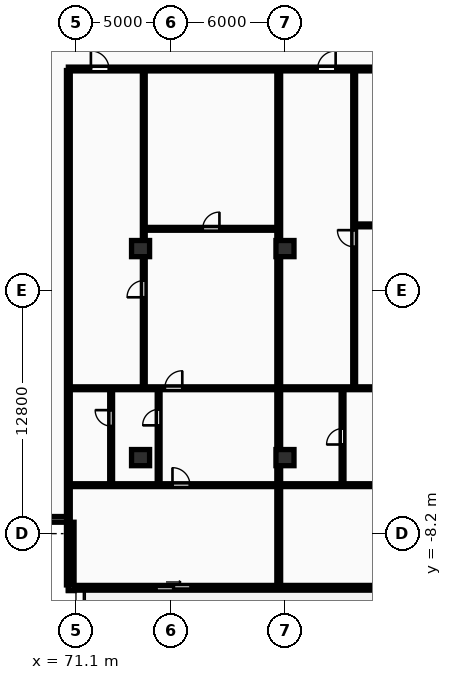
"""IFC4 building model, lengths in metres.
Left out: names, types, materials, properties, quantities, classifications, styles, units other than length and angle.
Written with IfcOpenShell. Run it as: python <this file> out.ifc"""

import sys

from ifc_helpers import new_model, si_unit, direction, frame, frame_2d, origin, origin_2d, place, context, subcontext, project, spatial, rectangle, extrude, element, fill, save


model = new_model("IFC4")
c1 = context("Model", 3, precision=1e-05, world=origin(), true_north=direction((0.0, 1.0)))
c2 = subcontext(c1, "Body", "Model", "MODEL_VIEW")
j1 = project(units=[si_unit("LENGTHUNIT", "METRE"), si_unit("PLANEANGLEUNIT", "RADIAN")], contexts=[c1])
p1 = place(None, origin())
s1 = spatial("IfcSite", under=j1, at=p1, CompositionType="ELEMENT")
p2 = place(p1, origin())
s2 = spatial("IfcBuilding", under=s1, at=p2, CompositionType="ELEMENT")
p3 = place(p2, frame((0.0, 0.0, 24.0)))
s3 = spatial("IfcBuildingStorey", under=s2, at=p3, CompositionType="ELEMENT", Elevation=24.0)
for number, where, z_axis, x_axis in (
    (1, (74.5, -4.2, 0.0), (0.0, 0.0, 1.0), (1.0, 0.0, 0.0)),
    (2, (74.5, 6.8, 0.0), (0.0, 0.0, 1.0), (1.0, 0.0, 0.0)),
    (3, (82.1, -4.2, 0.0), (0.0, 0.0, 1.0), (1.0, 0.0, 0.0)),
    (4, (82.1, 6.8, 0.0), (0.0, 0.0, 1.0), (1.0, 0.0, 0.0)),
):
    element("IfcColumn", number, at=place(p3, frame(where, z_axis=z_axis, x_axis=x_axis)), inside=s3, PredefinedType="COLUMN", context=c2, shape_type="SweptSolid", body=[
        extrude(rectangle(XDim=0.95, YDim=0.85, at=origin_2d()), origin(), (0.0, 0.0, 1.0), 3.25),
    ])
p4 = place(p3, frame((70.7, -11.05, 0.0), z_axis=(0.0, 0.0, 1.0), x_axis=(1.0, 0.0, 0.0)))
e5 = element("IfcWall", 5, at=p4, inside=s3, PredefinedType="STANDARD", context=c2, shape_type="SweptSolid", body=[
    extrude(rectangle(XDim=62.0, YDim=0.25, at=frame_2d((31.0, 0.0))), origin(), (0.0, 0.0, 1.0), 2.97),
])
p5 = place(p4, frame((4.636, 0.0, 0.0)))
e6 = element("IfcOpeningElement", 6, at=p5, cuts=e5, PredefinedType="OPENING", context=c2, shape_type="SweptSolid", body=[
    extrude(rectangle(XDim=1.8, YDim=2.2, at=frame_2d((0.9, 1.1))), frame((0.0, 0.135, 0.0), z_axis=(0.0, -1.0, 0.0), x_axis=(1.0, 0.0, 0.0)), (0.0, 0.0, 1.0), 0.27),
])
p6 = place(p4, frame((16.261, 0.0, 0.0)))
e7 = element("IfcOpeningElement", 7, at=p6, cuts=e5, PredefinedType="OPENING", context=c2, shape_type="SweptSolid", body=[
    extrude(rectangle(XDim=1.8, YDim=2.2, at=frame_2d((0.9, 1.1))), frame((0.0, 0.135, 0.0), z_axis=(0.0, -1.0, 0.0), x_axis=(1.0, 0.0, 0.0)), (0.0, 0.0, 1.0), 0.27),
])
p7 = place(p4, frame((27.886, 0.0, 0.0)))
e8 = element("IfcOpeningElement", 8, at=p7, cuts=e5, PredefinedType="OPENING", context=c2, shape_type="SweptSolid", body=[
    extrude(rectangle(XDim=1.8, YDim=2.2, at=frame_2d((0.9, 1.1))), frame((0.0, 0.135, 0.0), z_axis=(0.0, -1.0, 0.0), x_axis=(1.0, 0.0, 0.0)), (0.0, 0.0, 1.0), 0.27),
])
p8 = place(p4, frame((40.064, 0.0, 0.0)))
e9 = element("IfcOpeningElement", 9, at=p8, cuts=e5, PredefinedType="OPENING", context=c2, shape_type="SweptSolid", body=[
    extrude(rectangle(XDim=1.8, YDim=2.2, at=frame_2d((0.9, 1.1))), frame((0.0, 0.135, 0.0), z_axis=(0.0, -1.0, 0.0), x_axis=(1.0, 0.0, 0.0)), (0.0, 0.0, 1.0), 0.27),
])
p9 = place(p4, frame((51.124, 0.0, 0.0)))
e10 = element("IfcOpeningElement", 10, at=p9, cuts=e5, PredefinedType="OPENING", context=c2, shape_type="SweptSolid", body=[
    extrude(rectangle(XDim=1.8, YDim=2.2, at=frame_2d((0.9, 1.1))), frame((0.0, 0.135, 0.0), z_axis=(0.0, -1.0, 0.0), x_axis=(1.0, 0.0, 0.0)), (0.0, 0.0, 1.0), 0.27),
])
p10 = place(p4, frame((57.9, 0.0, 0.85)))
e11 = element("IfcOpeningElement", 11, at=p10, cuts=e5, PredefinedType="OPENING", context=c2, shape_type="SweptSolid", body=[
    extrude(rectangle(XDim=2.4, YDim=1.9, at=frame_2d((1.2, 0.95))), frame((0.0, 0.135, 0.0), z_axis=(0.0, -1.0, 0.0), x_axis=(1.0, 0.0, 0.0)), (0.0, 0.0, 1.0), 0.27),
])
for number, where, z_axis, x_axis in (
    (12, (67.1, -7.45, 0.0), (0.0, 0.0, 1.0), (1.0, 0.0, 0.0)),
    (13, (70.85, -7.6, 0.0), (0.0, 0.0, 1.0), (0.0, -1.0, 0.0)),
):
    element("IfcWall", number, at=place(p3, frame(where, z_axis=z_axis, x_axis=x_axis)), inside=s3, PredefinedType="STANDARD", context=c2, shape_type="SweptSolid", body=[
        extrude(rectangle(XDim=3.6, YDim=0.3, at=frame_2d((1.8, 0.0))), origin(), (0.0, 0.0, 1.0), 2.97),
    ])
p11 = place(p3, frame((70.7, -10.9, 0.0), z_axis=(0.0, 0.0, 1.0), x_axis=(0.0, 1.0, 0.0)))
e14 = element("IfcWall", 14, at=p11, inside=s3, PredefinedType="PARTITIONING", context=c2, shape_type="SweptSolid", body=[
    extrude(rectangle(XDim=27.07, YDim=0.2, at=frame_2d((13.535, 0.0))), origin(), (0.0, 0.0, 1.0), 2.97),
])
p12 = place(p3, frame((81.771, -10.9, 0.0), z_axis=(0.0, 0.0, 1.0), x_axis=(0.0, 1.0, 0.0)))
e15 = element("IfcWall", 15, at=p12, inside=s3, PredefinedType="PARTITIONING", context=c2, shape_type="SweptSolid", body=[
    extrude(rectangle(XDim=27.07, YDim=0.2, at=frame_2d((13.535, 0.0))), origin(), (0.0, 0.0, 1.0), 2.22),
])
p13 = place(p3, frame((74.73, 7.84, 0.0), z_axis=(0.0, 0.0, 1.0), x_axis=(1.0, 0.0, 0.0)))
e16 = element("IfcWall", 16, at=p13, inside=s3, PredefinedType="PARTITIONING", context=c2, shape_type="SweptSolid", body=[
    extrude(rectangle(XDim=6.961, YDim=0.15, at=frame_2d((3.481, 0.0))), origin(), (0.0, 0.0, 1.0), 2.97),
])
p14 = place(p13, frame((3.041, 0.0, 0.0)))
e17 = element("IfcOpeningElement", 17, at=p14, cuts=e16, PredefinedType="OPENING", context=c2, shape_type="SweptSolid", body=[
    extrude(rectangle(XDim=0.88, YDim=2.06, at=frame_2d((0.44, 1.03))), frame((0.0, 0.085, 0.0), z_axis=(0.0, -1.0, 0.0), x_axis=(1.0, 0.0, 0.0)), (0.0, 0.0, 1.0), 0.17),
])
p15 = place(p3, frame((74.67, -0.51, 0.0), z_axis=(0.0, 0.0, 1.0), x_axis=(0.0, 1.0, 0.0)))
e18 = element("IfcWall", 18, at=p15, inside=s3, PredefinedType="PARTITIONING", context=c2, shape_type="SweptSolid", body=[
    extrude(rectangle(XDim=16.7, YDim=0.15, at=frame_2d((8.35, 0.0))), origin(), (0.0, 0.0, 1.0), 2.22),
])
p16 = place(p15, frame((4.747, 0.0, 0.0)))
e19 = element("IfcOpeningElement", 19, at=p16, cuts=e18, PredefinedType="OPENING", context=c2, shape_type="SweptSolid", body=[
    extrude(rectangle(XDim=0.88, YDim=2.06, at=frame_2d((0.44, 1.03))), frame((0.0, 0.085, 0.0), z_axis=(0.0, -1.0, 0.0), x_axis=(1.0, 0.0, 0.0)), (0.0, 0.0, 1.0), 0.17),
])
p17 = place(p3, frame((72.951, -5.59, 0.0), z_axis=(0.0, 0.0, 1.0), x_axis=(0.0, 1.0, 0.0)))
e20 = element("IfcWall", 20, at=p17, inside=s3, PredefinedType="PARTITIONING", context=c2, shape_type="SweptSolid", body=[
    extrude(rectangle(XDim=5.0, YDim=0.15, at=frame_2d((2.5, 0.0))), origin(), (0.0, 0.0, 1.0), 2.97),
])
p18 = place(p17, frame((3.049, 0.0, 0.0)))
e21 = element("IfcOpeningElement", 21, at=p18, cuts=e20, PredefinedType="OPENING", context=c2, shape_type="SweptSolid", body=[
    extrude(rectangle(XDim=0.84, YDim=2.04, at=frame_2d((0.42, 1.02))), frame((0.0, 0.085, 0.0), z_axis=(0.0, -1.0, 0.0), x_axis=(1.0, 0.0, 0.0)), (0.0, 0.0, 1.0), 0.17),
])
p19 = place(p3, frame((75.451, -5.59, 0.0), z_axis=(0.0, 0.0, 1.0), x_axis=(0.0, 1.0, 0.0)))
e22 = element("IfcWall", 22, at=p19, inside=s3, PredefinedType="PARTITIONING", context=c2, shape_type="SweptSolid", body=[
    extrude(rectangle(XDim=5.0, YDim=0.15, at=frame_2d((2.5, 0.0))), origin(), (0.0, 0.0, 1.0), 2.97),
])
p20 = place(p19, frame((3.088, 0.0, 0.0)))
e23 = element("IfcOpeningElement", 23, at=p20, cuts=e22, PredefinedType="OPENING", context=c2, shape_type="SweptSolid", body=[
    extrude(rectangle(XDim=0.84, YDim=2.04, at=frame_2d((0.42, 1.02))), frame((0.0, 0.085, 0.0), z_axis=(0.0, -1.0, 0.0), x_axis=(1.0, 0.0, 0.0)), (0.0, 0.0, 1.0), 0.17),
])
p21 = place(p3, frame((70.78, -0.55, 0.0), z_axis=(0.0, 0.0, 1.0), x_axis=(1.0, 0.0, 0.0)))
e24 = element("IfcWall", 24, at=p21, inside=s3, PredefinedType="PARTITIONING", context=c2, shape_type="SweptSolid", body=[
    extrude(rectangle(XDim=10.911, YDim=0.15, at=frame_2d((5.456, 0.0))), origin(), (0.0, 0.0, 1.0), 2.97),
])
p22 = place(p21, frame((4.996, 0.0, 0.0)))
e25 = element("IfcOpeningElement", 25, at=p22, cuts=e24, PredefinedType="OPENING", context=c2, shape_type="SweptSolid", body=[
    extrude(rectangle(XDim=0.92, YDim=2.08, at=frame_2d((0.46, 1.04))), frame((0.0, 0.085, 0.0), z_axis=(0.0, -1.0, 0.0), x_axis=(1.0, 0.0, 0.0)), (0.0, 0.0, 1.0), 0.17),
])
p23 = place(p3, frame((70.78, -5.65, 0.0), z_axis=(0.0, 0.0, 1.0), x_axis=(1.0, 0.0, 0.0)))
e26 = element("IfcWall", 26, at=p23, inside=s3, PredefinedType="PARTITIONING", context=c2, shape_type="SweptSolid", body=[
    extrude(rectangle(XDim=10.911, YDim=0.15, at=frame_2d((5.456, 0.0))), origin(), (0.0, 0.0, 1.0), 2.97),
])
p24 = place(p23, frame((5.399, 0.0, 0.0)))
e27 = element("IfcOpeningElement", 27, at=p24, cuts=e26, PredefinedType="OPENING", context=c2, shape_type="SweptSolid", body=[
    extrude(rectangle(XDim=0.92, YDim=2.08, at=frame_2d((0.46, 1.04))), frame((0.0, 0.085, 0.0), z_axis=(0.0, -1.0, 0.0), x_axis=(1.0, 0.0, 0.0)), (0.0, 0.0, 1.0), 0.17),
])
p25 = place(p3, frame((85.802, 8.02, 0.0), z_axis=(0.0, 0.0, 1.0), x_axis=(1.0, 0.0, 0.0)))
e28 = element("IfcWall", 28, at=p25, inside=s3, PredefinedType="PARTITIONING", context=c2, shape_type="SweptSolid", body=[
    extrude(rectangle(XDim=8.069, YDim=0.15, at=frame_2d((4.034, 0.0))), origin(), (0.0, 0.0, 1.0), 2.97),
])
p26 = place(p25, frame((2.716, 0.0, 0.0)))
e29 = element("IfcOpeningElement", 29, at=p26, cuts=e28, PredefinedType="OPENING", context=c2, shape_type="SweptSolid", body=[
    extrude(rectangle(XDim=0.88, YDim=2.06, at=frame_2d((0.44, 1.03))), frame((0.0, 0.085, 0.0), z_axis=(0.0, -1.0, 0.0), x_axis=(1.0, 0.0, 0.0)), (0.0, 0.0, 1.0), 0.17),
])
p27 = place(p3, frame((85.741, -0.51, 0.0), z_axis=(0.0, 0.0, 1.0), x_axis=(0.0, 1.0, 0.0)))
e30 = element("IfcWall", 30, at=p27, inside=s3, PredefinedType="PARTITIONING", context=c2, shape_type="SweptSolid", body=[
    extrude(rectangle(XDim=16.7, YDim=0.15, at=frame_2d((8.35, 0.0))), origin(), (0.0, 0.0, 1.0), 2.97),
])
p28 = place(p27, frame((7.4, 0.0, 0.0)))
e31 = element("IfcOpeningElement", 31, at=p28, cuts=e30, PredefinedType="OPENING", context=c2, shape_type="SweptSolid", body=[
    extrude(rectangle(XDim=0.88, YDim=2.06, at=frame_2d((0.44, 1.03))), frame((0.0, 0.085, 0.0), z_axis=(0.0, -1.0, 0.0), x_axis=(1.0, 0.0, 0.0)), (0.0, 0.0, 1.0), 0.17),
])
p29 = place(p3, frame((85.13, -5.59, 0.0), z_axis=(0.0, 0.0, 1.0), x_axis=(0.0, 1.0, 0.0)))
e32 = element("IfcWall", 32, at=p29, inside=s3, PredefinedType="PARTITIONING", context=c2, shape_type="SweptSolid", body=[
    extrude(rectangle(XDim=5.0, YDim=0.15, at=frame_2d((2.5, 0.0))), origin(), (0.0, 0.0, 1.0), 2.97),
])
p30 = place(p29, frame((2.08, 0.0, 0.0)))
e33 = element("IfcOpeningElement", 33, at=p30, cuts=e32, PredefinedType="OPENING", context=c2, shape_type="SweptSolid", body=[
    extrude(rectangle(XDim=0.84, YDim=2.04, at=frame_2d((0.42, 1.02))), frame((0.0, 0.085, 0.0), z_axis=(0.0, -1.0, 0.0), x_axis=(1.0, 0.0, 0.0)), (0.0, 0.0, 1.0), 0.17),
])
p31 = place(p3, frame((81.851, -0.55, 0.0), z_axis=(0.0, 0.0, 1.0), x_axis=(1.0, 0.0, 0.0)))
e34 = element("IfcWall", 34, at=p31, inside=s3, PredefinedType="PARTITIONING", context=c2, shape_type="SweptSolid", body=[
    extrude(rectangle(XDim=12.019, YDim=0.15, at=frame_2d((6.009, 0.0))), origin(), (0.0, 0.0, 1.0), 2.97),
])
p32 = place(p31, frame((5.999, 0.0, 0.0)))
e35 = element("IfcOpeningElement", 35, at=p32, cuts=e34, PredefinedType="OPENING", context=c2, shape_type="SweptSolid", body=[
    extrude(rectangle(XDim=0.92, YDim=2.08, at=frame_2d((0.46, 1.04))), frame((0.0, 0.085, 0.0), z_axis=(0.0, -1.0, 0.0), x_axis=(1.0, 0.0, 0.0)), (0.0, 0.0, 1.0), 0.17),
])
p33 = place(p3, frame((81.851, -5.65, 0.0), z_axis=(0.0, 0.0, 1.0), x_axis=(1.0, 0.0, 0.0)))
e36 = element("IfcWall", 36, at=p33, inside=s3, PredefinedType="PARTITIONING", context=c2, shape_type="SweptSolid", body=[
    extrude(rectangle(XDim=12.019, YDim=0.15, at=frame_2d((6.009, 0.0))), origin(), (0.0, 0.0, 1.0), 2.97),
])
p34 = place(p33, frame((6.029, 0.0, 0.0)))
e37 = element("IfcOpeningElement", 37, at=p34, cuts=e36, PredefinedType="OPENING", context=c2, shape_type="SweptSolid", body=[
    extrude(rectangle(XDim=0.92, YDim=2.08, at=frame_2d((0.46, 1.04))), frame((0.0, 0.085, 0.0), z_axis=(0.0, -1.0, 0.0), x_axis=(1.0, 0.0, 0.0)), (0.0, 0.0, 1.0), 0.17),
])
p35 = place(p3, frame((70.7, 16.25, 0.0), z_axis=(0.0, 0.0, 1.0), x_axis=(1.0, 0.0, 0.0)))
e38 = element("IfcWall", 38, at=p35, inside=s3, PredefinedType="PARTITIONING", context=c2, shape_type="SweptSolid", body=[
    extrude(rectangle(XDim=62.0, YDim=0.2, at=frame_2d((31.0, 0.0))), origin(), (0.0, 0.0, 1.0), 2.97),
])
p36 = place(p35, frame((1.186, 0.0, 0.0)))
e39 = element("IfcOpeningElement", 39, at=p36, cuts=e38, PredefinedType="OPENING", context=c2, shape_type="SweptSolid", body=[
    extrude(rectangle(XDim=0.95, YDim=2.15, at=frame_2d((0.475, 1.075))), frame((0.0, 0.11, 0.0), z_axis=(0.0, -1.0, 0.0), x_axis=(1.0, 0.0, 0.0)), (0.0, 0.0, 1.0), 0.22),
])
p37 = place(p35, frame((13.116, 0.0, 0.0)))
e40 = element("IfcOpeningElement", 40, at=p37, cuts=e38, PredefinedType="OPENING", context=c2, shape_type="SweptSolid", body=[
    extrude(rectangle(XDim=0.95, YDim=2.15, at=frame_2d((0.475, 1.075))), frame((0.0, 0.11, 0.0), z_axis=(0.0, -1.0, 0.0), x_axis=(1.0, 0.0, 0.0)), (0.0, 0.0, 1.0), 0.22),
])
p38 = place(p35, frame((25.295, 0.0, 0.0)))
e41 = element("IfcOpeningElement", 41, at=p38, cuts=e38, PredefinedType="OPENING", context=c2, shape_type="SweptSolid", body=[
    extrude(rectangle(XDim=0.95, YDim=2.15, at=frame_2d((0.475, 1.075))), frame((0.0, 0.11, 0.0), z_axis=(0.0, -1.0, 0.0), x_axis=(1.0, 0.0, 0.0)), (0.0, 0.0, 1.0), 0.22),
])
p39 = place(p35, frame((35.747, 0.0, 0.0)))
e42 = element("IfcOpeningElement", 42, at=p39, cuts=e38, PredefinedType="OPENING", context=c2, shape_type="SweptSolid", body=[
    extrude(rectangle(XDim=0.95, YDim=2.15, at=frame_2d((0.475, 1.075))), frame((0.0, 0.11, 0.0), z_axis=(0.0, -1.0, 0.0), x_axis=(1.0, 0.0, 0.0)), (0.0, 0.0, 1.0), 0.22),
])
p40 = place(p35, frame((49.652, 0.0, 0.0)))
e43 = element("IfcOpeningElement", 43, at=p40, cuts=e38, PredefinedType="OPENING", context=c2, shape_type="SweptSolid", body=[
    extrude(rectangle(XDim=0.95, YDim=2.15, at=frame_2d((0.475, 1.075))), frame((0.0, 0.11, 0.0), z_axis=(0.0, -1.0, 0.0), x_axis=(1.0, 0.0, 0.0)), (0.0, 0.0, 1.0), 0.22),
])
p41 = place(p5, origin())
e44 = element("IfcDoor", 44, at=p41, inside=s3, OperationType="SLIDING_TO_RIGHT", PredefinedType="DOOR", context=c2, shape_type="SweptSolid", body=[
    extrude(rectangle(XDim=1.8, YDim=2.2, at=frame_2d((0.9, 1.1))), frame((0.0, 0.025, 0.0), z_axis=(0.0, -1.0, 0.0), x_axis=(1.0, 0.0, 0.0)), (0.0, 0.0, 1.0), 0.05),
])
fill(e6, e44)
p42 = place(p14, origin())
e45 = element("IfcDoor", 45, at=p42, inside=s3, OperationType="SINGLE_SWING_RIGHT", PredefinedType="DOOR", context=c2, shape_type="SweptSolid", body=[
    extrude(rectangle(XDim=0.88, YDim=2.06, at=frame_2d((0.44, 1.03))), frame((0.0, 0.025, 0.0), z_axis=(0.0, -1.0, 0.0), x_axis=(1.0, 0.0, 0.0)), (0.0, 0.0, 1.0), 0.05),
])
fill(e17, e45)
p43 = place(p16, origin())
e46 = element("IfcDoor", 46, at=p43, inside=s3, OperationType="SINGLE_SWING_LEFT", PredefinedType="DOOR", context=c2, shape_type="SweptSolid", body=[
    extrude(rectangle(XDim=0.88, YDim=2.06, at=frame_2d((0.44, 1.03))), frame((0.0, 0.025, 0.0), z_axis=(0.0, -1.0, 0.0), x_axis=(1.0, 0.0, 0.0)), (0.0, 0.0, 1.0), 0.05),
])
fill(e19, e46)
p44 = place(p18, origin())
e47 = element("IfcDoor", 47, at=p44, inside=s3, OperationType="SINGLE_SWING_RIGHT", PredefinedType="DOOR", context=c2, shape_type="SweptSolid", body=[
    extrude(rectangle(XDim=0.84, YDim=2.04, at=frame_2d((0.42, 1.02))), frame((0.0, 0.025, 0.0), z_axis=(0.0, -1.0, 0.0), x_axis=(1.0, 0.0, 0.0)), (0.0, 0.0, 1.0), 0.05),
])
fill(e21, e47)
p45 = place(p20, origin())
e48 = element("IfcDoor", 48, at=p45, inside=s3, OperationType="SINGLE_SWING_LEFT", PredefinedType="DOOR", context=c2, shape_type="SweptSolid", body=[
    extrude(rectangle(XDim=0.84, YDim=2.04, at=frame_2d((0.42, 1.02))), frame((0.0, 0.025, 0.0), z_axis=(0.0, -1.0, 0.0), x_axis=(1.0, 0.0, 0.0)), (0.0, 0.0, 1.0), 0.05),
])
fill(e23, e48)
p46 = place(p22, origin())
e49 = element("IfcDoor", 49, at=p46, inside=s3, OperationType="SINGLE_SWING_RIGHT", PredefinedType="DOOR", context=c2, shape_type="SweptSolid", body=[
    extrude(rectangle(XDim=0.92, YDim=2.08, at=frame_2d((0.46, 1.04))), frame((0.0, 0.025, 0.0), z_axis=(0.0, -1.0, 0.0), x_axis=(1.0, 0.0, 0.0)), (0.0, 0.0, 1.0), 0.05),
])
fill(e25, e49)
p47 = place(p24, origin())
e50 = element("IfcDoor", 50, at=p47, inside=s3, OperationType="SINGLE_SWING_LEFT", PredefinedType="DOOR", context=c2, shape_type="SweptSolid", body=[
    extrude(rectangle(XDim=0.92, YDim=2.08, at=frame_2d((0.46, 1.04))), frame((0.0, 0.025, 0.0), z_axis=(0.0, -1.0, 0.0), x_axis=(1.0, 0.0, 0.0)), (0.0, 0.0, 1.0), 0.05),
])
fill(e27, e50)
p48 = place(p28, origin())
e51 = element("IfcDoor", 51, at=p48, inside=s3, OperationType="SINGLE_SWING_RIGHT", PredefinedType="DOOR", context=c2, shape_type="SweptSolid", body=[
    extrude(rectangle(XDim=0.88, YDim=2.06, at=frame_2d((0.44, 1.03))), frame((0.0, 0.025, 0.0), z_axis=(0.0, -1.0, 0.0), x_axis=(1.0, 0.0, 0.0)), (0.0, 0.0, 1.0), 0.05),
])
fill(e31, e51)
p49 = place(p30, origin())
e52 = element("IfcDoor", 52, at=p49, inside=s3, OperationType="SINGLE_SWING_LEFT", PredefinedType="DOOR", context=c2, shape_type="SweptSolid", body=[
    extrude(rectangle(XDim=0.84, YDim=2.04, at=frame_2d((0.42, 1.02))), frame((0.0, 0.025, 0.0), z_axis=(0.0, -1.0, 0.0), x_axis=(1.0, 0.0, 0.0)), (0.0, 0.0, 1.0), 0.05),
])
fill(e33, e52)
p50 = place(p36, origin())
e53 = element("IfcDoor", 53, at=p50, inside=s3, OperationType="SINGLE_SWING_LEFT", PredefinedType="DOOR", context=c2, shape_type="SweptSolid", body=[
    extrude(rectangle(XDim=0.95, YDim=2.15, at=frame_2d((0.475, 1.075))), frame((0.0, 0.025, 0.0), z_axis=(0.0, -1.0, 0.0), x_axis=(1.0, 0.0, 0.0)), (0.0, 0.0, 1.0), 0.05),
])
fill(e39, e53)
p51 = place(p37, origin())
e54 = element("IfcDoor", 54, at=p51, inside=s3, OperationType="SINGLE_SWING_RIGHT", PredefinedType="DOOR", context=c2, shape_type="SweptSolid", body=[
    extrude(rectangle(XDim=0.95, YDim=2.15, at=frame_2d((0.475, 1.075))), frame((0.0, 0.025, 0.0), z_axis=(0.0, -1.0, 0.0), x_axis=(1.0, 0.0, 0.0)), (0.0, 0.0, 1.0), 0.05),
])
fill(e40, e54)
save(model, sys.argv[1])
